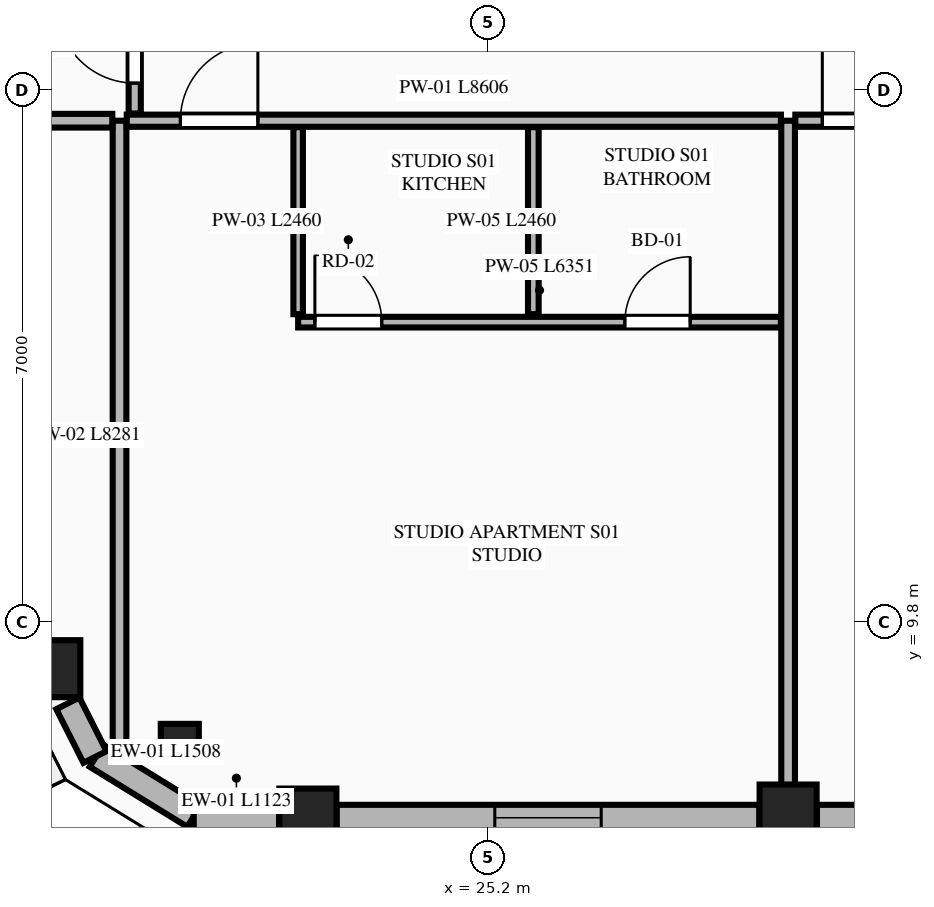
"""IFC4 building model, lengths in metres.
Left out: names, types, materials, properties, quantities, classifications, styles, units other than length and angle.
Written with IfcOpenShell. Run it as: python <this file> out.ifc"""

import sys

from ifc_helpers import new_model, si_unit, direction, frame, frame_2d, origin, origin_2d, place, context, subcontext, project, spatial, rectangle, extrude, element, fill, save


model = new_model("IFC4")
c1 = context("Model", 3, precision=1e-05, world=origin(), true_north=direction((0.0, 1.0)))
c2 = subcontext(c1, "Body", "Model", "MODEL_VIEW")
j1 = project(units=[si_unit("LENGTHUNIT", "METRE"), si_unit("PLANEANGLEUNIT", "RADIAN")], contexts=[c1])
p1 = place(None, origin())
s1 = spatial("IfcSite", under=j1, at=p1, CompositionType="ELEMENT")
p2 = place(p1, origin())
s2 = spatial("IfcBuilding", under=s1, at=p2, CompositionType="ELEMENT")
p3 = place(p2, frame((0.0, 0.0, 241.6)))
s3 = spatial("IfcBuildingStorey", under=s2, at=p3, CompositionType="ELEMENT", Elevation=241.6)
for number, where, z_axis, x_axis in (
    (1, (22.828, 7.239, 0.0), (0.0, 0.0, 1.0), (1.0, 0.0, 0.0)),
    (2, (29.146, 7.292, 0.0), (0.0, 0.0, 1.0), (1.0, 0.0, 0.0)),
    (3, (19.459, 9.191, 0.0), (0.0, 0.0, 1.0), (1.0, 0.0, 0.0)),
):
    element("IfcColumn", number, at=place(p3, frame(where, z_axis=z_axis, x_axis=x_axis)), inside=s3, PredefinedType="COLUMN", context=c2, shape_type="SweptSolid", body=[
        extrude(rectangle(XDim=0.75, YDim=0.75, at=origin_2d()), origin(), (0.0, 0.0, 1.0), 3.65),
    ])
p4 = place(p3, frame((21.143, 8.215, 0.0), z_axis=(0.0, 0.0, 1.0), x_axis=(0.865256437757, -0.501329529272, 0.0)))
e4 = element("IfcColumn", 4, at=p4, inside=s3, PredefinedType="PILASTER", context=c2, shape_type="SweptSolid", body=[
    extrude(rectangle(XDim=0.5, YDim=0.35, at=origin_2d()), origin(), (0.0, 0.0, 1.0), 3.65),
])
p5 = place(p3, frame((20.047, 8.045, 0.0), z_axis=(0.0, 0.0, 1.0), x_axis=(0.851680557619, -0.52406128246, 0.0)))
e5 = element("IfcWall", 5, at=p5, inside=s3, PredefinedType="STANDARD", context=c2, shape_type="SweptSolid", body=[
    extrude(rectangle(XDim=1.508, YDim=0.34, at=frame_2d((0.754, 0.0))), origin(), (0.0, 0.0, 1.0), 3.45),
])
p6 = place(p3, frame((21.326, 7.23, 0.0), z_axis=(0.0, 0.0, 1.0), x_axis=(1.0, 0.0, 0.0)))
e6 = element("IfcWall", 6, at=p6, inside=s3, PredefinedType="STANDARD", context=c2, shape_type="SweptSolid", body=[
    extrude(rectangle(XDim=1.123, YDim=0.34, at=frame_2d((0.562, 0.0))), origin(), (0.0, 0.0, 1.0), 3.45),
])
p7 = place(p3, frame((23.207, 7.23, 0.0), z_axis=(0.0, 0.0, 1.0), x_axis=(1.0, 0.0, 0.0)))
e7 = element("IfcWall", 7, at=p7, inside=s3, PredefinedType="STANDARD", context=c2, shape_type="SweptSolid", body=[
    extrude(rectangle(XDim=5.56, YDim=0.34, at=frame_2d((2.78, 0.0))), origin(), (0.0, 0.0, 1.0), 2.983),
])
p8 = place(p7, frame((2.08, 0.0, 0.75)))
e8 = element("IfcOpeningElement", 8, at=p8, cuts=e7, PredefinedType="OPENING", context=c2, shape_type="SweptSolid", body=[
    extrude(rectangle(XDim=1.4, YDim=2.05, at=frame_2d((0.7, 1.025))), frame((0.0, 0.18, 0.0), z_axis=(0.0, -1.0, 0.0), x_axis=(1.0, 0.0, 0.0)), (0.0, 0.0, 1.0), 0.36),
])
p9 = place(p3, frame((29.525, 7.23, 0.0), z_axis=(0.0, 0.0, 1.0), x_axis=(1.0, 0.0, 0.0)))
e9 = element("IfcWall", 9, at=p9, inside=s3, PredefinedType="STANDARD", context=c2, shape_type="SweptSolid", body=[
    extrude(rectangle(XDim=5.75, YDim=0.34, at=frame_2d((2.875, 0.0))), origin(), (0.0, 0.0, 1.0), 2.983),
])
p10 = place(p9, frame((2.325, 0.0, 0.0)))
e10 = element("IfcOpeningElement", 10, at=p10, cuts=e9, PredefinedType="OPENING", context=c2, shape_type="SweptSolid", body=[
    extrude(rectangle(XDim=1.1, YDim=2.25, at=frame_2d((0.55, 1.125))), frame((0.0, 0.18, 0.0), z_axis=(0.0, -1.0, 0.0), x_axis=(1.0, 0.0, 0.0)), (0.0, 0.0, 1.0), 0.36),
])
p11 = place(p3, frame((19.67, 8.735, 0.0), z_axis=(0.0, 0.0, 1.0), x_axis=(0.451404919072, -0.89231922485, 0.0)))
e11 = element("IfcWall", 11, at=p11, inside=s3, PredefinedType="STANDARD", context=c2, shape_type="SweptSolid", body=[
    extrude(rectangle(XDim=0.791, YDim=0.34, at=frame_2d((0.396, 0.0))), origin(), (0.0, 0.0, 1.0), 3.45),
])
p12 = place(p3, frame((20.35, 8.119, 0.0), z_axis=(0.0, 0.0, 1.0), x_axis=(0.0, 1.0, 0.0)))
e12 = element("IfcWall", 12, at=p12, inside=s3, PredefinedType="PARTITIONING", context=c2, shape_type="SweptSolid", body=[
    extrude(rectangle(XDim=8.281, YDim=0.18, at=frame_2d((4.141, 0.0))), origin(), (0.0, 0.0, 1.0), 3.45),
])
p13 = place(p3, frame((29.146, 7.405, 0.0), z_axis=(0.0, 0.0, 1.0), x_axis=(0.0, 1.0, 0.0)))
e13 = element("IfcWall", 13, at=p13, inside=s3, PredefinedType="PARTITIONING", context=c2, shape_type="SweptSolid", body=[
    extrude(rectangle(XDim=8.995, YDim=0.18, at=frame_2d((4.498, 0.0))), origin(), (0.0, 0.0, 1.0), 2.907),
])
p14 = place(p3, frame((20.445, 16.4, 0.0), z_axis=(0.0, 0.0, 1.0), x_axis=(1.0, 0.0, 0.0)))
e14 = element("IfcWall", 14, at=p14, inside=s3, PredefinedType="PARTITIONING", context=c2, shape_type="SweptSolid", body=[
    extrude(rectangle(XDim=8.606, YDim=0.16, at=frame_2d((4.303, 0.0))), origin(), (0.0, 0.0, 1.0), 3.45),
])
p15 = place(p14, frame((0.705, 0.0, 0.0)))
e15 = element("IfcOpeningElement", 15, at=p15, cuts=e14, PredefinedType="OPENING", context=c2, shape_type="SweptSolid", body=[
    extrude(rectangle(XDim=1.02, YDim=2.25, at=frame_2d((0.51, 1.125))), frame((0.0, 0.09, 0.0), z_axis=(0.0, -1.0, 0.0), x_axis=(1.0, 0.0, 0.0)), (0.0, 0.0, 1.0), 0.18),
])
p16 = place(p3, frame((22.7, 13.855, 0.0), z_axis=(0.0, 0.0, 1.0), x_axis=(0.0, 1.0, 0.0)))
e16 = element("IfcWall", 16, at=p16, inside=s3, PredefinedType="PARTITIONING", context=c2, shape_type="SweptSolid", body=[
    extrude(rectangle(XDim=2.46, YDim=0.125, at=frame_2d((1.23, 0.0))), origin(), (0.0, 0.0, 1.0), 2.907),
])
p17 = place(p3, frame((22.7, 13.75, 0.0), z_axis=(0.0, 0.0, 1.0), x_axis=(1.0, 0.0, 0.0)))
e17 = element("IfcWall", 17, at=p17, inside=s3, PredefinedType="PLUMBINGWALL", context=c2, shape_type="SweptSolid", body=[
    extrude(rectangle(XDim=6.351, YDim=0.14, at=frame_2d((3.176, 0.0))), origin(), (0.0, 0.0, 1.0), 3.45),
])
p18 = place(p17, frame((4.298, 0.0, 0.0)))
e18 = element("IfcOpeningElement", 18, at=p18, cuts=e17, PredefinedType="OPENING", context=c2, shape_type="SweptSolid", body=[
    extrude(rectangle(XDim=0.86, YDim=2.1, at=frame_2d((0.43, 1.05))), frame((0.0, 0.08, 0.0), z_axis=(0.0, -1.0, 0.0), x_axis=(1.0, 0.0, 0.0)), (0.0, 0.0, 1.0), 0.16),
])
p19 = place(p17, frame((0.22, 0.0, 0.0)))
e19 = element("IfcOpeningElement", 19, at=p19, cuts=e17, PredefinedType="OPENING", context=c2, shape_type="SweptSolid", body=[
    extrude(rectangle(XDim=0.88, YDim=2.15, at=frame_2d((0.44, 1.075))), frame((0.0, 0.08, 0.0), z_axis=(0.0, -1.0, 0.0), x_axis=(1.0, 0.0, 0.0)), (0.0, 0.0, 1.0), 0.16),
])
p20 = place(p3, frame((25.794, 13.855, 0.0), z_axis=(0.0, 0.0, 1.0), x_axis=(0.0, 1.0, 0.0)))
e20 = element("IfcWall", 20, at=p20, inside=s3, PredefinedType="PLUMBINGWALL", context=c2, shape_type="SweptSolid", body=[
    extrude(rectangle(XDim=2.46, YDim=0.14, at=frame_2d((1.23, 0.0))), origin(), (0.0, 0.0, 1.0), 3.45),
])
p21 = place(p3, frame((29.241, 16.4, 0.0), z_axis=(0.0, 0.0, 1.0), x_axis=(1.0, 0.0, 0.0)))
e21 = element("IfcWall", 21, at=p21, inside=s3, PredefinedType="PARTITIONING", context=c2, shape_type="SweptSolid", body=[
    extrude(rectangle(XDim=6.318, YDim=0.16, at=frame_2d((3.159, 0.0))), origin(), (0.0, 0.0, 1.0), 3.45),
])
p22 = place(p21, frame((0.355, 0.0, 0.0)))
e22 = element("IfcOpeningElement", 22, at=p22, cuts=e21, PredefinedType="OPENING", context=c2, shape_type="SweptSolid", body=[
    extrude(rectangle(XDim=1.02, YDim=2.25, at=frame_2d((0.51, 1.125))), frame((0.0, 0.09, 0.0), z_axis=(0.0, -1.0, 0.0), x_axis=(1.0, 0.0, 0.0)), (0.0, 0.0, 1.0), 0.18),
])
p23 = place(p3, frame((16.034, 16.4, 0.0), z_axis=(0.0, 0.0, 1.0), x_axis=(1.0, 0.0, 0.0)))
e23 = element("IfcWall", 23, at=p23, inside=s3, PredefinedType="PARTITIONING", context=c2, shape_type="SweptSolid", body=[
    extrude(rectangle(XDim=4.221, YDim=0.18, at=frame_2d((2.11, 0.0))), origin(), (0.0, 0.0, 1.0), 3.45),
])
p24 = place(p3, frame((20.55, 16.495, 0.0), z_axis=(0.0, 0.0, 1.0), x_axis=(0.0, 1.0, 0.0)))
e24 = element("IfcWall", 24, at=p24, inside=s3, PredefinedType="PARTITIONING", context=c2, shape_type="SweptSolid", body=[
    extrude(rectangle(XDim=5.948, YDim=0.16, at=frame_2d((2.974, 0.0))), origin(), (0.0, 0.0, 1.0), 3.137),
])
p25 = place(p24, frame((0.4, 0.0, 0.0)))
e25 = element("IfcOpeningElement", 25, at=p25, cuts=e24, PredefinedType="OPENING", context=c2, shape_type="SweptSolid", body=[
    extrude(rectangle(XDim=1.02, YDim=2.25, at=frame_2d((0.51, 1.125))), frame((0.0, 0.09, 0.0), z_axis=(0.0, -1.0, 0.0), x_axis=(1.0, 0.0, 0.0)), (0.0, 0.0, 1.0), 0.18),
])
p26 = place(p8, origin())
e26 = element("IfcWindow", 26, at=p26, inside=s3, PartitioningType="SINGLE_PANEL", PredefinedType="WINDOW", context=c2, shape_type="SweptSolid", body=[
    extrude(rectangle(XDim=1.4, YDim=2.05, at=frame_2d((0.7, 1.025))), frame((0.0, 0.03, 0.0), z_axis=(0.0, -1.0, 0.0), x_axis=(1.0, 0.0, 0.0)), (0.0, 0.0, 1.0), 0.06),
])
fill(e8, e26)
p27 = place(p18, origin())
e27 = element("IfcDoor", 27, at=p27, inside=s3, OperationType="SINGLE_SWING_RIGHT", PredefinedType="DOOR", context=c2, shape_type="SweptSolid", body=[
    extrude(rectangle(XDim=0.86, YDim=2.1, at=frame_2d((0.43, 1.05))), frame((0.0, 0.025, 0.0), z_axis=(0.0, -1.0, 0.0), x_axis=(1.0, 0.0, 0.0)), (0.0, 0.0, 1.0), 0.05),
])
fill(e18, e27)
p28 = place(p15, origin())
e28 = element("IfcDoor", 28, at=p28, inside=s3, OperationType="SINGLE_SWING_RIGHT", PredefinedType="DOOR", context=c2, shape_type="SweptSolid", body=[
    extrude(rectangle(XDim=1.02, YDim=2.25, at=frame_2d((0.51, 1.125))), frame((0.0, 0.025, 0.0), z_axis=(0.0, -1.0, 0.0), x_axis=(1.0, 0.0, 0.0)), (0.0, 0.0, 1.0), 0.05),
])
fill(e15, e28)
p29 = place(p19, origin())
e29 = element("IfcDoor", 29, at=p29, inside=s3, OperationType="SINGLE_SWING_LEFT", PredefinedType="DOOR", context=c2, shape_type="SweptSolid", body=[
    extrude(rectangle(XDim=0.88, YDim=2.15, at=frame_2d((0.44, 1.075))), frame((0.0, 0.025, 0.0), z_axis=(0.0, -1.0, 0.0), x_axis=(1.0, 0.0, 0.0)), (0.0, 0.0, 1.0), 0.05),
])
fill(e19, e29)
p30 = place(p22, origin())
e30 = element("IfcDoor", 30, at=p30, inside=s3, OperationType="SINGLE_SWING_LEFT", PredefinedType="DOOR", context=c2, shape_type="SweptSolid", body=[
    extrude(rectangle(XDim=1.02, YDim=2.25, at=frame_2d((0.51, 1.125))), frame((0.0, 0.025, 0.0), z_axis=(0.0, -1.0, 0.0), x_axis=(1.0, 0.0, 0.0)), (0.0, 0.0, 1.0), 0.05),
])
fill(e22, e30)
p31 = place(p25, origin())
e31 = element("IfcDoor", 31, at=p31, inside=s3, OperationType="SINGLE_SWING_RIGHT", PredefinedType="DOOR", context=c2, shape_type="SweptSolid", body=[
    extrude(rectangle(XDim=1.02, YDim=2.25, at=frame_2d((0.51, 1.125))), frame((0.0, 0.025, 0.0), z_axis=(0.0, -1.0, 0.0), x_axis=(1.0, 0.0, 0.0)), (0.0, 0.0, 1.0), 0.05),
])
fill(e25, e31)
save(model, sys.argv[1])
